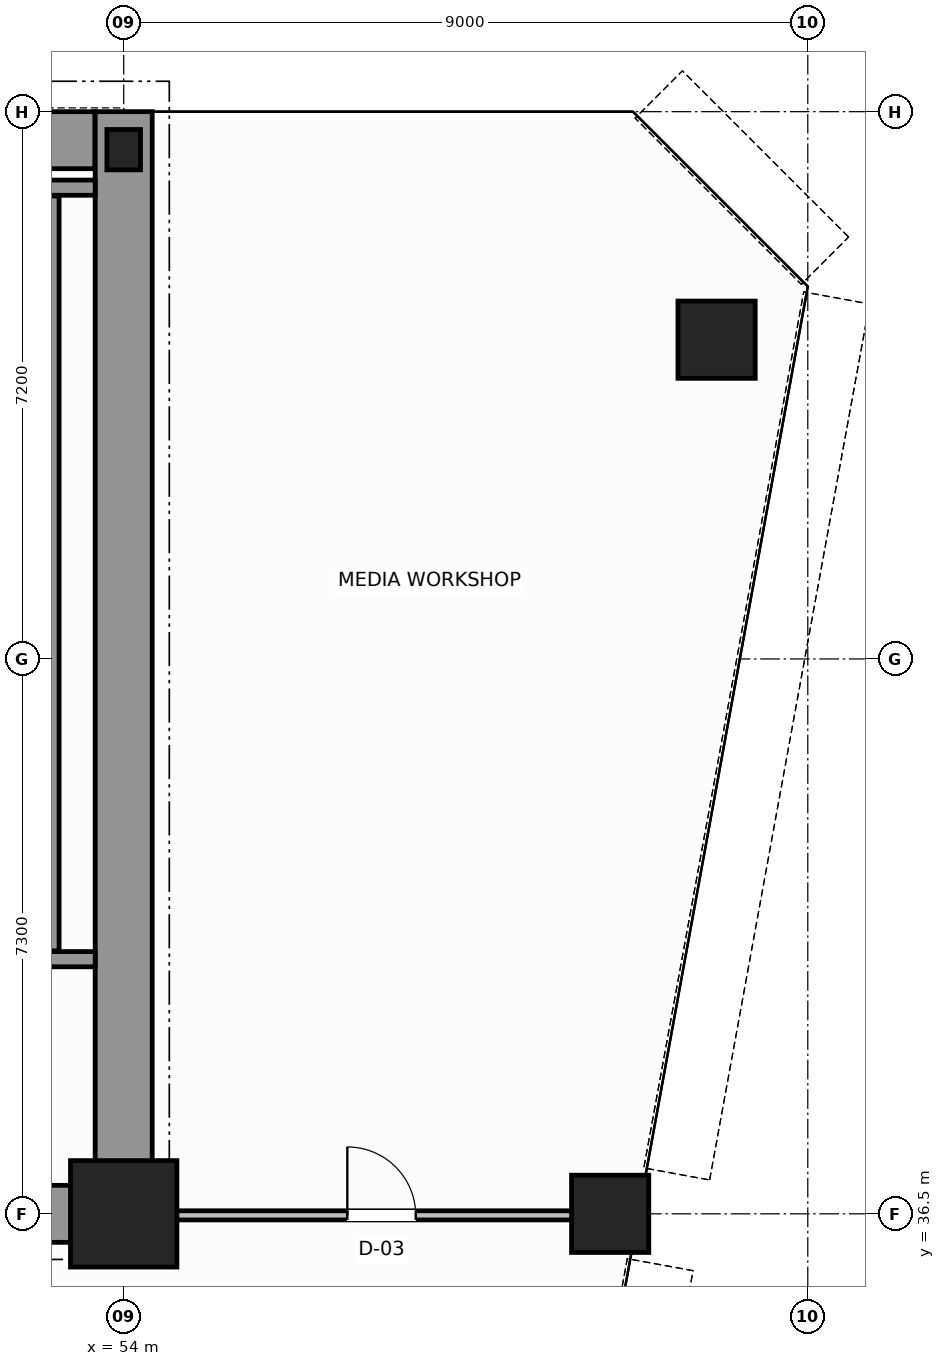
"""IFC4 building model, lengths in metres.
Left out: names, types, materials, properties, quantities, classifications, styles, units other than length and angle.
Written with IfcOpenShell. Run it as: python <this file> out.ifc"""

import sys

from ifc_helpers import new_model, si_unit, direction, frame, frame_2d, origin, origin_2d, place, context, subcontext, project, spatial, rectangle, hollow_circle, i_section, extrude, source, transform, mapped, element, fill, save


model = new_model("IFC4")
c1 = context("Model", 3, precision=1e-05, world=origin(), true_north=direction((0.0, 1.0)))
c2 = subcontext(c1, "Body", "Model", "MODEL_VIEW")
j1 = project(units=[si_unit("LENGTHUNIT", "METRE"), si_unit("PLANEANGLEUNIT", "RADIAN")], contexts=[c1])
p1 = place(None, origin())
s1 = spatial("IfcSite", under=j1, at=p1, CompositionType="ELEMENT")
p2 = place(p1, origin())
s2 = spatial("IfcBuilding", under=s1, at=p2, CompositionType="ELEMENT")
p3 = place(p2, frame((0.0, 0.0, 95.8)))
s3 = spatial("IfcBuildingStorey", under=s2, at=p3, CompositionType="ELEMENT", Elevation=95.8)
m1 = source(origin(), c2, "Body", "SweptSolid", [
    extrude(rectangle(XDim=1.4, YDim=1.4, at=origin_2d()), origin(), (0.0, 0.0, 1.0), 3.8),
])
p4 = place(p3, frame((54.0, 36.5, 0.0), z_axis=(0.0, 0.0, 1.0), x_axis=(1.0, 0.0, 0.0)))
e1 = element("IfcColumn", 1, at=p4, inside=s3, PredefinedType="COLUMN", context=c2, shape_type="MappedRepresentation", body=[
    mapped(m1, transform((0.0, 0.0, 0.0), scale=1.0)),
])
m2 = source(origin(), c2, "Body", "SweptSolid", [
    extrude(i_section(OverallWidth=0.442, OverallDepth=0.531, WebThickness=0.065, FlangeThickness=0.076, FilletRadius=0.015, at=origin_2d()), origin(), (0.0, 0.0, 1.0), 3.8),
])
p5 = place(p3, frame((54.0, 50.5, 0.0), z_axis=(0.0, 0.0, 1.0), x_axis=(1.0, 0.0, 0.0)))
e2 = element("IfcColumn", 2, at=p5, inside=s3, PredefinedType="COLUMN", context=c2, shape_type="MappedRepresentation", body=[
    mapped(m2, transform((0.0, 0.0, 0.0), scale=1.0)),
])
m3 = source(origin(), c2, "Body", "SweptSolid", [
    extrude(hollow_circle(Radius=0.508, WallThickness=0.045, at=origin_2d()), origin(), (0.0, 0.0, 1.0), 3.8),
])
for number, where, z_axis, x_axis in (
    (3, (61.8, 48.0, 0.0), (0.0, 0.0, 1.0), (1.0, 0.0, 0.0)),
    (4, (60.4, 36.5, 0.0), (0.0, 0.0, 1.0), (1.0, 0.0, 0.0)),
):
    element("IfcColumn", number, at=place(p3, frame(where, z_axis=z_axis, x_axis=x_axis)), inside=s3, PredefinedType="COLUMN", context=c2, shape_type="MappedRepresentation", body=[
        mapped(m3, transform((0.0, 0.0, 0.0), scale=1.0)),
    ])
p6 = place(p3, frame((34.002, 50.625, 0.0), z_axis=(0.0, 0.0, 1.0), x_axis=(1.0, 0.0, 0.0)))
e5 = element("IfcWall", 5, at=p6, inside=s3, PredefinedType="SHEAR", context=c2, shape_type="SweptSolid", body=[
    extrude(rectangle(XDim=19.619, YDim=0.75, at=frame_2d((9.81, 0.0))), origin(), (0.0, 0.0, 1.0), 3.8),
])
p7 = place(p3, frame((54.0, 36.5, 0.0), z_axis=(0.0, 0.0, 1.0), x_axis=(0.0, 1.0, 0.0)))
e6 = element("IfcWall", 6, at=p7, inside=s3, PredefinedType="SHEAR", context=c2, shape_type="SweptSolid", body=[
    extrude(rectangle(XDim=14.5, YDim=0.75, at=frame_2d((7.25, 0.0))), origin(), (0.0, 0.0, 1.0), 3.8),
])
p8 = place(p3, frame((49.8, 36.5, 0.0), z_axis=(0.0, 0.0, 1.0), x_axis=(1.0, 0.0, 0.0)))
e7 = element("IfcWall", 7, at=p8, inside=s3, PredefinedType="SHEAR", context=c2, shape_type="SweptSolid", body=[
    extrude(rectangle(XDim=3.805, YDim=0.75, at=frame_2d((1.902, 0.0))), origin(), (0.0, 0.0, 1.0), 2.38),
])
p9 = place(p3, frame((49.4, 39.85, 0.0), z_axis=(0.0, 0.0, 1.0), x_axis=(1.0, 0.0, 0.0)))
e8 = element("IfcWall", 8, at=p9, inside=s3, PredefinedType="SOLIDWALL", context=c2, shape_type="SweptSolid", body=[
    extrude(rectangle(XDim=4.225, YDim=0.2, at=frame_2d((2.113, 0.0))), origin(), (0.0, 0.0, 1.0), 3.8),
])
p10 = place(p9, frame((1.325, 0.0, 0.0)))
e9 = element("IfcOpeningElement", 9, at=p10, cuts=e8, PredefinedType="OPENING", context=c2, shape_type="SweptSolid", body=[
    extrude(rectangle(XDim=1.1, YDim=2.15, at=frame_2d((0.55, 1.075))), frame((0.0, 0.11, 0.0), z_axis=(0.0, -1.0, 0.0), x_axis=(1.0, 0.0, 0.0)), (0.0, 0.0, 1.0), 0.22),
])
p11 = place(p3, frame((49.4, 50.0, 0.0), z_axis=(0.0, 0.0, 1.0), x_axis=(1.0, 0.0, 0.0)))
e10 = element("IfcWall", 10, at=p11, inside=s3, PredefinedType="SOLIDWALL", context=c2, shape_type="SweptSolid", body=[
    extrude(rectangle(XDim=4.225, YDim=0.2, at=frame_2d((2.113, 0.0))), origin(), (0.0, 0.0, 1.0), 3.8),
])
p12 = place(p3, frame((53.05, 39.96, 0.0), z_axis=(0.0, 0.0, 1.0), x_axis=(0.0, 1.0, 0.0)))
e11 = element("IfcWall", 11, at=p12, inside=s3, PredefinedType="SOLIDWALL", context=c2, shape_type="SweptSolid", body=[
    extrude(rectangle(XDim=9.93, YDim=0.2, at=frame_2d((4.965, 0.0))), origin(), (0.0, 0.0, 1.0), 3.8),
])
p13 = place(p3, frame((54.06, 36.48, 0.0), z_axis=(0.0, 0.0, 1.0), x_axis=(1.0, 0.0, 0.0)))
e12 = element("IfcWall", 12, at=p13, inside=s3, PredefinedType="PARTITIONING", context=c2, shape_type="SweptSolid", body=[
    extrude(rectangle(XDim=6.664, YDim=0.12, at=frame_2d((3.332, 0.0))), origin(), (0.0, 0.0, 1.0), 2.87),
])
p14 = place(p13, frame((2.882, 0.0, 0.0)))
e13 = element("IfcOpeningElement", 13, at=p14, cuts=e12, PredefinedType="OPENING", context=c2, shape_type="SweptSolid", body=[
    extrude(rectangle(XDim=0.9, YDim=2.15, at=frame_2d((0.45, 1.075))), frame((0.0, 0.07, 0.0), z_axis=(0.0, -1.0, 0.0), x_axis=(1.0, 0.0, 0.0)), (0.0, 0.0, 1.0), 0.14),
])
m4 = source(origin(), c2, "Body", "SweptSolid", [
    extrude(rectangle(XDim=0.9, YDim=2.15, at=frame_2d((0.45, 1.075))), frame((0.0, 0.025, 0.0), z_axis=(0.0, -1.0, 0.0), x_axis=(1.0, 0.0, 0.0)), (0.0, 0.0, 1.0), 0.05),
])
p15 = place(p14, origin())
e14 = element("IfcDoor", 14, at=p15, inside=s3, OperationType="SINGLE_SWING_RIGHT", PredefinedType="DOOR", context=c2, shape_type="MappedRepresentation", body=[
    mapped(m4, transform((0.0, 0.0, 0.0), scale=1.0)),
])
fill(e13, e14)
save(model, sys.argv[1])
